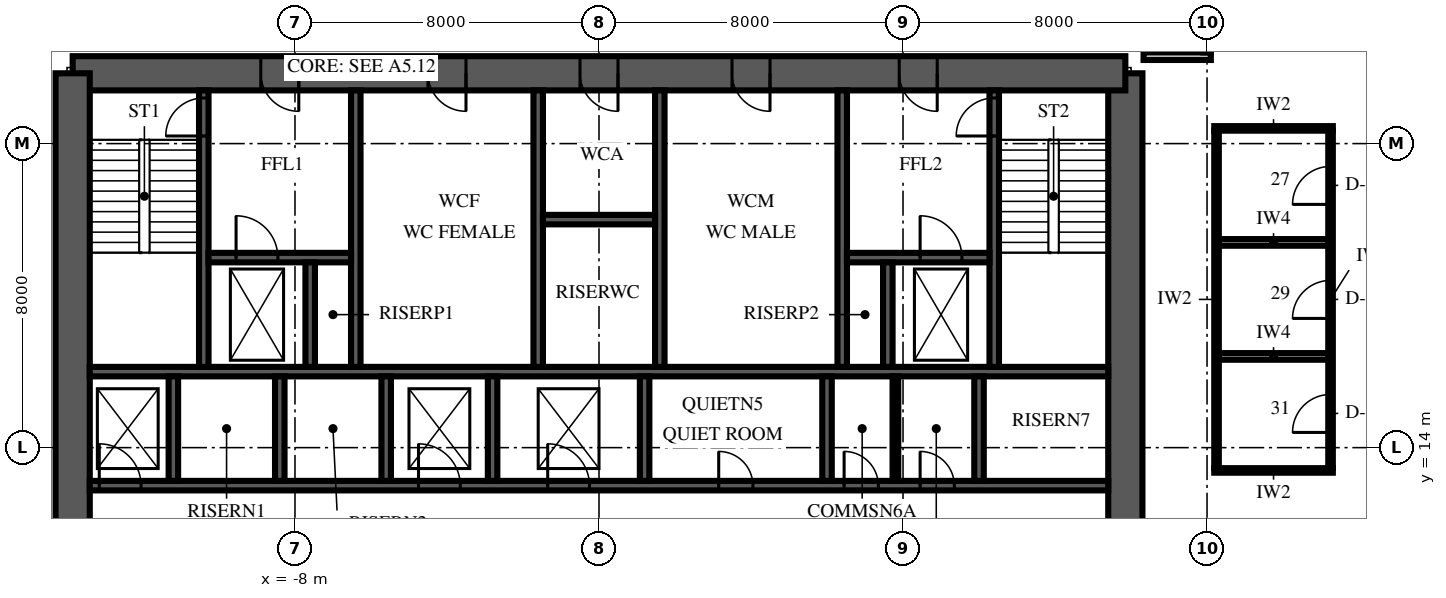
"""IFC4 building model, lengths in metres.
Left out: names, types, materials, properties, quantities, classifications, styles, units other than length and angle.
Written with IfcOpenShell. Run it as: python <this file> out.ifc"""

import sys

from ifc_helpers import new_model, si_unit, direction, frame, frame_2d, origin, place, context, subcontext, project, spatial, polyline, rectangle, outline, extrude, element, fill, save


model = new_model("IFC4")
c1 = context("Model", 3, precision=1e-05, world=origin(), true_north=direction((0.0, 1.0)))
c2 = subcontext(c1, "Body", "Model", "MODEL_VIEW")
j1 = project(units=[si_unit("LENGTHUNIT", "METRE"), si_unit("PLANEANGLEUNIT", "RADIAN")], contexts=[c1])
p1 = place(None, origin())
s1 = spatial("IfcSite", under=j1, at=p1, CompositionType="ELEMENT")
p2 = place(p1, origin())
s2 = spatial("IfcBuilding", under=s1, at=p2, CompositionType="ELEMENT")
p3 = place(p2, frame((0.0, 0.0, 72.0)))
s3 = spatial("IfcBuildingStorey", under=s2, at=p3, CompositionType="ELEMENT", Elevation=72.0)
p4 = place(p3, frame((13.85, 6.15, 0.0), z_axis=(0.0, 0.0, 1.0), x_axis=(0.0, 1.0, 0.0)))
e1 = element("IfcWall", 1, at=p4, inside=s3, PredefinedType="SHEAR", context=c2, shape_type="SweptSolid", body=[
    extrude(outline(polyline([(0.0, -0.45), (17.7, -0.45), (17.7, 0.0), (17.25, 0.0), (17.25, 0.45), (0.45, 0.45), (0.45, 0.0), (0.0, 0.0), (0.0, -0.45)])), origin(), (0.0, 0.0, 1.0), 4.0),
])
p5 = place(p4, frame((4.15, 0.0, 0.0)))
e2 = element("IfcOpeningElement", 2, at=p5, cuts=e1, PredefinedType="OPENING", context=c2, shape_type="SweptSolid", body=[
    extrude(rectangle(XDim=1.8, YDim=2.4, at=frame_2d((0.9, 1.2))), frame((0.0, 0.465, 0.0), z_axis=(0.0, -1.0, 0.0), x_axis=(1.0, 0.0, 0.0)), (0.0, 0.0, 1.0), 0.93),
])
p6 = place(p3, frame((13.85, 23.85, 0.0), z_axis=(0.0, 0.0, 1.0), x_axis=(-1.0, 0.0, 0.0)))
e3 = element("IfcWall", 3, at=p6, inside=s3, PredefinedType="SHEAR", context=c2, shape_type="SweptSolid", body=[
    extrude(rectangle(XDim=27.7, YDim=0.9, at=frame_2d((13.85, 0.0))), origin(), (0.0, 0.0, 1.0), 4.0),
])
p7 = place(p6, frame((21.75, 0.0, 0.0)))
e4 = element("IfcOpeningElement", 4, at=p7, cuts=e3, PredefinedType="OPENING", context=c2, shape_type="SweptSolid", body=[
    extrude(rectangle(XDim=1.0, YDim=2.1, at=frame_2d((0.5, 1.05))), frame((0.0, 0.465, 0.0), z_axis=(0.0, -1.0, 0.0), x_axis=(1.0, 0.0, 0.0)), (0.0, 0.0, 1.0), 0.93),
])
p8 = place(p6, frame((4.95, 0.0, 0.0)))
e5 = element("IfcOpeningElement", 5, at=p8, cuts=e3, PredefinedType="OPENING", context=c2, shape_type="SweptSolid", body=[
    extrude(rectangle(XDim=1.0, YDim=2.1, at=frame_2d((0.5, 1.05))), frame((0.0, 0.465, 0.0), z_axis=(0.0, -1.0, 0.0), x_axis=(1.0, 0.0, 0.0)), (0.0, 0.0, 1.0), 0.93),
])
p9 = place(p6, frame((17.35, 0.0, 0.0)))
e6 = element("IfcOpeningElement", 6, at=p9, cuts=e3, PredefinedType="OPENING", context=c2, shape_type="SweptSolid", body=[
    extrude(rectangle(XDim=1.0, YDim=2.1, at=frame_2d((0.5, 1.05))), frame((0.0, 0.465, 0.0), z_axis=(0.0, -1.0, 0.0), x_axis=(1.0, 0.0, 0.0)), (0.0, 0.0, 1.0), 0.93),
])
p10 = place(p6, frame((13.35, 0.0, 0.0)))
e7 = element("IfcOpeningElement", 7, at=p10, cuts=e3, PredefinedType="OPENING", context=c2, shape_type="SweptSolid", body=[
    extrude(rectangle(XDim=1.0, YDim=2.1, at=frame_2d((0.5, 1.05))), frame((0.0, 0.465, 0.0), z_axis=(0.0, -1.0, 0.0), x_axis=(1.0, 0.0, 0.0)), (0.0, 0.0, 1.0), 0.93),
])
p11 = place(p6, frame((9.35, 0.0, 0.0)))
e8 = element("IfcOpeningElement", 8, at=p11, cuts=e3, PredefinedType="OPENING", context=c2, shape_type="SweptSolid", body=[
    extrude(rectangle(XDim=1.0, YDim=2.1, at=frame_2d((0.5, 1.05))), frame((0.0, 0.465, 0.0), z_axis=(0.0, -1.0, 0.0), x_axis=(1.0, 0.0, 0.0)), (0.0, 0.0, 1.0), 0.93),
])
p12 = place(p3, frame((-13.85, 23.85, 0.0), z_axis=(0.0, 0.0, 1.0), x_axis=(0.0, -1.0, 0.0)))
e9 = element("IfcWall", 9, at=p12, inside=s3, PredefinedType="SHEAR", context=c2, shape_type="SweptSolid", body=[
    extrude(outline(polyline([(0.0, -0.45), (17.7, -0.45), (17.7, 0.0), (17.25, 0.0), (17.25, 0.45), (0.45, 0.45), (0.45, 0.0), (0.0, 0.0), (0.0, -0.45)])), origin(), (0.0, 0.0, 1.0), 4.0),
])
p13 = place(p12, frame((11.75, 0.0, 0.0)))
e10 = element("IfcOpeningElement", 10, at=p13, cuts=e9, PredefinedType="OPENING", context=c2, shape_type="SweptSolid", body=[
    extrude(rectangle(XDim=1.8, YDim=2.4, at=frame_2d((0.9, 1.2))), frame((0.0, 0.465, 0.0), z_axis=(0.0, -1.0, 0.0), x_axis=(1.0, 0.0, 0.0)), (0.0, 0.0, 1.0), 0.93),
])
p14 = place(p3, frame((-13.4, 13.0, 0.0), z_axis=(0.0, 0.0, 1.0), x_axis=(1.0, 0.0, 0.0)))
e11 = element("IfcWall", 11, at=p14, inside=s3, PredefinedType="SHEAR", context=c2, shape_type="SweptSolid", body=[
    extrude(rectangle(XDim=26.8, YDim=0.25, at=frame_2d((13.4, 0.0))), origin(), (0.0, 0.0, 1.0), 4.0),
])
p15 = place(p14, frame((0.25, 0.0, 0.0)))
e12 = element("IfcOpeningElement", 12, at=p15, cuts=e11, PredefinedType="OPENING", context=c2, shape_type="SweptSolid", body=[
    extrude(rectangle(XDim=1.1, YDim=2.1, at=frame_2d((0.55, 1.05))), frame((0.0, 0.14, 0.0), z_axis=(0.0, -1.0, 0.0), x_axis=(1.0, 0.0, 0.0)), (0.0, 0.0, 1.0), 0.28),
])
p16 = place(p14, frame((8.65, 0.0, 0.0)))
e13 = element("IfcOpeningElement", 13, at=p16, cuts=e11, PredefinedType="OPENING", context=c2, shape_type="SweptSolid", body=[
    extrude(rectangle(XDim=1.1, YDim=2.1, at=frame_2d((0.55, 1.05))), frame((0.0, 0.14, 0.0), z_axis=(0.0, -1.0, 0.0), x_axis=(1.0, 0.0, 0.0)), (0.0, 0.0, 1.0), 0.28),
])
p17 = place(p14, frame((12.05, 0.0, 0.0)))
e14 = element("IfcOpeningElement", 14, at=p17, cuts=e11, PredefinedType="OPENING", context=c2, shape_type="SweptSolid", body=[
    extrude(rectangle(XDim=1.1, YDim=2.1, at=frame_2d((0.55, 1.05))), frame((0.0, 0.14, 0.0), z_axis=(0.0, -1.0, 0.0), x_axis=(1.0, 0.0, 0.0)), (0.0, 0.0, 1.0), 0.28),
])
p18 = place(p14, frame((16.55, 0.0, 0.0)))
e15 = element("IfcOpeningElement", 15, at=p18, cuts=e11, PredefinedType="OPENING", context=c2, shape_type="SweptSolid", body=[
    extrude(rectangle(XDim=0.9, YDim=2.1, at=frame_2d((0.45, 1.05))), frame((0.0, 0.14, 0.0), z_axis=(0.0, -1.0, 0.0), x_axis=(1.0, 0.0, 0.0)), (0.0, 0.0, 1.0), 0.28),
])
p19 = place(p14, frame((19.85, 0.0, 0.0)))
e16 = element("IfcOpeningElement", 16, at=p19, cuts=e11, PredefinedType="OPENING", context=c2, shape_type="SweptSolid", body=[
    extrude(rectangle(XDim=0.9, YDim=2.1, at=frame_2d((0.45, 1.05))), frame((0.0, 0.14, 0.0), z_axis=(0.0, -1.0, 0.0), x_axis=(1.0, 0.0, 0.0)), (0.0, 0.0, 1.0), 0.28),
])
p20 = place(p14, frame((21.85, 0.0, 0.0)))
e17 = element("IfcOpeningElement", 17, at=p20, cuts=e11, PredefinedType="OPENING", context=c2, shape_type="SweptSolid", body=[
    extrude(rectangle(XDim=0.9, YDim=2.1, at=frame_2d((0.45, 1.05))), frame((0.0, 0.14, 0.0), z_axis=(0.0, -1.0, 0.0), x_axis=(1.0, 0.0, 0.0)), (0.0, 0.0, 1.0), 0.28),
])
p21 = place(p3, frame((-13.4, 16.0, 0.0), z_axis=(0.0, 0.0, 1.0), x_axis=(1.0, 0.0, 0.0)))
e18 = element("IfcWall", 18, at=p21, inside=s3, PredefinedType="SHEAR", context=c2, shape_type="SweptSolid", body=[
    extrude(rectangle(XDim=26.8, YDim=0.25, at=frame_2d((13.4, 0.0))), origin(), (0.0, 0.0, 1.0), 4.0),
])
for number, where, z_axis, x_axis in (
    (19, (-11.2, 13.125, 0.0), (0.0, 0.0, 1.0), (0.0, 1.0, 0.0)),
    (20, (-8.4, 13.125, 0.0), (0.0, 0.0, 1.0), (0.0, 1.0, 0.0)),
    (21, (-5.6, 13.125, 0.0), (0.0, 0.0, 1.0), (0.0, 1.0, 0.0)),
    (22, (-2.8, 13.125, 0.0), (0.0, 0.0, 1.0), (0.0, 1.0, 0.0)),
    (23, (1.2, 13.125, 0.0), (0.0, 0.0, 1.0), (0.0, 1.0, 0.0)),
    (24, (6.0, 13.125, 0.0), (0.0, 0.0, 1.0), (0.0, 1.0, 0.0)),
    (25, (10.0, 13.125, 0.0), (0.0, 0.0, 1.0), (0.0, 1.0, 0.0)),
):
    element("IfcWall", number, at=place(p3, frame(where, z_axis=z_axis, x_axis=x_axis)), inside=s3, PredefinedType="SHEAR", context=c2, shape_type="SweptSolid", body=[
        extrude(rectangle(XDim=2.75, YDim=0.25, at=frame_2d((1.375, 0.0))), origin(), (0.0, 0.0, 1.0), 4.0),
    ])
p22 = place(p3, frame((-10.4, 16.125, 0.0), z_axis=(0.0, 0.0, 1.0), x_axis=(0.0, 1.0, 0.0)))
e26 = element("IfcWall", 26, at=p22, inside=s3, PredefinedType="SHEAR", context=c2, shape_type="SweptSolid", body=[
    extrude(rectangle(XDim=7.275, YDim=0.25, at=frame_2d((3.637, 0.0))), origin(), (0.0, 0.0, 1.0), 4.0),
])
p23 = place(p22, frame((6.075, 0.0, 0.0)))
e27 = element("IfcOpeningElement", 27, at=p23, cuts=e26, PredefinedType="OPENING", context=c2, shape_type="SweptSolid", body=[
    extrude(rectangle(XDim=1.0, YDim=2.1, at=frame_2d((0.5, 1.05))), frame((0.0, 0.14, 0.0), z_axis=(0.0, -1.0, 0.0), x_axis=(1.0, 0.0, 0.0)), (0.0, 0.0, 1.0), 0.28),
])
for number, where, z_axis, x_axis in (
    (28, (-6.4, 16.125, 0.0), (0.0, 0.0, 1.0), (0.0, 1.0, 0.0)),
    (29, (-1.6, 16.125, 0.0), (0.0, 0.0, 1.0), (0.0, 1.0, 0.0)),
    (30, (1.6, 16.125, 0.0), (0.0, 0.0, 1.0), (0.0, 1.0, 0.0)),
    (31, (6.4, 16.125, 0.0), (0.0, 0.0, 1.0), (0.0, 1.0, 0.0)),
):
    element("IfcWall", number, at=place(p3, frame(where, z_axis=z_axis, x_axis=x_axis)), inside=s3, PredefinedType="SHEAR", context=c2, shape_type="SweptSolid", body=[
        extrude(rectangle(XDim=7.275, YDim=0.25, at=frame_2d((3.637, 0.0))), origin(), (0.0, 0.0, 1.0), 4.0),
    ])
p24 = place(p3, frame((10.4, 16.125, 0.0), z_axis=(0.0, 0.0, 1.0), x_axis=(0.0, 1.0, 0.0)))
e32 = element("IfcWall", 32, at=p24, inside=s3, PredefinedType="SHEAR", context=c2, shape_type="SweptSolid", body=[
    extrude(rectangle(XDim=7.275, YDim=0.25, at=frame_2d((3.637, 0.0))), origin(), (0.0, 0.0, 1.0), 4.0),
])
p25 = place(p24, frame((6.075, 0.0, 0.0)))
e33 = element("IfcOpeningElement", 33, at=p25, cuts=e32, PredefinedType="OPENING", context=c2, shape_type="SweptSolid", body=[
    extrude(rectangle(XDim=1.0, YDim=2.1, at=frame_2d((0.5, 1.05))), frame((0.0, 0.14, 0.0), z_axis=(0.0, -1.0, 0.0), x_axis=(1.0, 0.0, 0.0)), (0.0, 0.0, 1.0), 0.28),
])
p26 = place(p3, frame((-10.275, 19.0, 0.0), z_axis=(0.0, 0.0, 1.0), x_axis=(1.0, 0.0, 0.0)))
e34 = element("IfcWall", 34, at=p26, inside=s3, PredefinedType="SHEAR", context=c2, shape_type="SweptSolid", body=[
    extrude(rectangle(XDim=3.75, YDim=0.25, at=frame_2d((1.875, 0.0))), origin(), (0.0, 0.0, 1.0), 4.0),
])
p27 = place(p26, frame((0.725, 0.0, 0.0)))
e35 = element("IfcOpeningElement", 35, at=p27, cuts=e34, PredefinedType="OPENING", context=c2, shape_type="SweptSolid", body=[
    extrude(rectangle(XDim=1.1, YDim=2.1, at=frame_2d((0.55, 1.05))), frame((0.0, 0.14, 0.0), z_axis=(0.0, -1.0, 0.0), x_axis=(1.0, 0.0, 0.0)), (0.0, 0.0, 1.0), 0.28),
])
p28 = place(p3, frame((6.525, 19.0, 0.0), z_axis=(0.0, 0.0, 1.0), x_axis=(1.0, 0.0, 0.0)))
e36 = element("IfcWall", 36, at=p28, inside=s3, PredefinedType="SHEAR", context=c2, shape_type="SweptSolid", body=[
    extrude(rectangle(XDim=3.75, YDim=0.25, at=frame_2d((1.875, 0.0))), origin(), (0.0, 0.0, 1.0), 4.0),
])
p29 = place(p28, frame((1.925, 0.0, 0.0)))
e37 = element("IfcOpeningElement", 37, at=p29, cuts=e36, PredefinedType="OPENING", context=c2, shape_type="SweptSolid", body=[
    extrude(rectangle(XDim=1.1, YDim=2.1, at=frame_2d((0.55, 1.05))), frame((0.0, 0.14, 0.0), z_axis=(0.0, -1.0, 0.0), x_axis=(1.0, 0.0, 0.0)), (0.0, 0.0, 1.0), 0.28),
])
for number, where, z_axis, x_axis in (
    (38, (-7.6, 16.125, 0.0), (0.0, 0.0, 1.0), (0.0, 1.0, 0.0)),
    (39, (7.6, 16.125, 0.0), (0.0, 0.0, 1.0), (0.0, 1.0, 0.0)),
):
    element("IfcWall", number, at=place(p3, frame(where, z_axis=z_axis, x_axis=x_axis)), inside=s3, PredefinedType="SHEAR", context=c2, shape_type="SweptSolid", body=[
        extrude(rectangle(XDim=2.75, YDim=0.25, at=frame_2d((1.375, 0.0))), origin(), (0.0, 0.0, 1.0), 4.0),
    ])
p30 = place(p3, frame((-1.475, 20.0, 0.0), z_axis=(0.0, 0.0, 1.0), x_axis=(1.0, 0.0, 0.0)))
e40 = element("IfcWall", 40, at=p30, inside=s3, PredefinedType="SHEAR", context=c2, shape_type="SweptSolid", body=[
    extrude(rectangle(XDim=2.95, YDim=0.25, at=frame_2d((1.475, 0.0))), origin(), (0.0, 0.0, 1.0), 4.0),
])
p31 = place(p3, frame((7.8, 13.125, 0.0), z_axis=(0.0, 0.0, 1.0), x_axis=(0.0, 1.0, 0.0)))
e41 = element("IfcWall", 41, at=p31, inside=s3, PredefinedType="PARTITIONING", context=c2, shape_type="SweptSolid", body=[
    extrude(rectangle(XDim=2.75, YDim=0.15, at=frame_2d((1.375, 0.0))), origin(), (0.0, 0.0, 1.0), 3.85),
])
p32 = place(p3, frame((16.19, 13.4, 0.0), z_axis=(0.0, 0.0, 1.0), x_axis=(1.0, 0.0, 0.0)))
e42 = element("IfcWall", 42, at=p32, inside=s3, PredefinedType="PARTITIONING", context=c2, shape_type="SweptSolid", body=[
    extrude(rectangle(XDim=3.12, YDim=0.12, at=frame_2d((1.56, 0.0))), origin(), (0.0, 0.0, 1.0), 3.85),
])
for number, where, z_axis, x_axis in (
    (43, (16.31, 16.4, 0.0), (0.0, 0.0, 1.0), (1.0, 0.0, 0.0)),
    (44, (16.31, 19.4, 0.0), (0.0, 0.0, 1.0), (1.0, 0.0, 0.0)),
):
    element("IfcWall", number, at=place(p3, frame(where, z_axis=z_axis, x_axis=x_axis)), inside=s3, PredefinedType="PARTITIONING", context=c2, shape_type="SweptSolid", body=[
        extrude(rectangle(XDim=2.88, YDim=0.175, at=frame_2d((1.44, 0.0))), origin(), (0.0, 0.0, 1.0), 3.85),
    ])
p33 = place(p3, frame((16.19, 22.4, 0.0), z_axis=(0.0, 0.0, 1.0), x_axis=(1.0, 0.0, 0.0)))
e45 = element("IfcWall", 45, at=p33, inside=s3, PredefinedType="PARTITIONING", context=c2, shape_type="SweptSolid", body=[
    extrude(rectangle(XDim=3.12, YDim=0.12, at=frame_2d((1.56, 0.0))), origin(), (0.0, 0.0, 1.0), 3.85),
])
p34 = place(p3, frame((14.33, 24.3, 0.0), z_axis=(0.0, 0.0, 1.0), x_axis=(1.0, 0.0, 0.0)))
e46 = element("IfcWall", 46, at=p34, inside=s3, PredefinedType="PARTITIONING", context=c2, shape_type="SweptSolid", body=[
    extrude(rectangle(XDim=1.77, YDim=0.2, at=frame_2d((0.885, 0.0))), origin(), (0.0, 0.0, 1.0), 3.4),
])
p35 = place(p3, frame((16.25, 13.46, 0.0), z_axis=(0.0, 0.0, 1.0), x_axis=(0.0, 1.0, 0.0)))
e47 = element("IfcWall", 47, at=p35, inside=s3, PredefinedType="PARTITIONING", context=c2, shape_type="SweptSolid", body=[
    extrude(rectangle(XDim=8.88, YDim=0.12, at=frame_2d((4.44, 0.0))), origin(), (0.0, 0.0, 1.0), 3.25),
])
p36 = place(p3, frame((19.25, 13.46, 0.0), z_axis=(0.0, 0.0, 1.0), x_axis=(0.0, 1.0, 0.0)))
e48 = element("IfcWall", 48, at=p36, inside=s3, PredefinedType="PARTITIONING", context=c2, shape_type="SweptSolid", body=[
    extrude(rectangle(XDim=8.88, YDim=0.12, at=frame_2d((4.44, 0.0))), origin(), (0.0, 0.0, 1.0), 3.25),
])
p37 = place(p36, frame((0.94, 0.0, 0.0)))
e49 = element("IfcOpeningElement", 49, at=p37, cuts=e48, PredefinedType="OPENING", context=c2, shape_type="SweptSolid", body=[
    extrude(rectangle(XDim=1.0, YDim=2.4, at=frame_2d((0.5, 1.2))), frame((0.0, 0.075, 0.0), z_axis=(0.0, -1.0, 0.0), x_axis=(1.0, 0.0, 0.0)), (0.0, 0.0, 1.0), 0.15),
])
p38 = place(p36, frame((3.94, 0.0, 0.0)))
e50 = element("IfcOpeningElement", 50, at=p38, cuts=e48, PredefinedType="OPENING", context=c2, shape_type="SweptSolid", body=[
    extrude(rectangle(XDim=1.0, YDim=2.4, at=frame_2d((0.5, 1.2))), frame((0.0, 0.075, 0.0), z_axis=(0.0, -1.0, 0.0), x_axis=(1.0, 0.0, 0.0)), (0.0, 0.0, 1.0), 0.15),
])
p39 = place(p36, frame((6.94, 0.0, 0.0)))
e51 = element("IfcOpeningElement", 51, at=p39, cuts=e48, PredefinedType="OPENING", context=c2, shape_type="SweptSolid", body=[
    extrude(rectangle(XDim=1.0, YDim=2.4, at=frame_2d((0.5, 1.2))), frame((0.0, 0.075, 0.0), z_axis=(0.0, -1.0, 0.0), x_axis=(1.0, 0.0, 0.0)), (0.0, 0.0, 1.0), 0.15),
])
p40 = place(p7, origin())
e52 = element("IfcDoor", 52, at=p40, inside=s3, OperationType="SINGLE_SWING_RIGHT", PredefinedType="DOOR", context=c2, shape_type="SweptSolid", body=[
    extrude(rectangle(XDim=1.0, YDim=2.1, at=frame_2d((0.5, 1.05))), frame((0.0, 0.45, 0.0), z_axis=(0.0, -1.0, 0.0), x_axis=(1.0, 0.0, 0.0)), (0.0, 0.0, 1.0), 0.899),
])
fill(e4, e52)
p41 = place(p8, origin())
e53 = element("IfcDoor", 53, at=p41, inside=s3, OperationType="SINGLE_SWING_RIGHT", PredefinedType="DOOR", context=c2, shape_type="SweptSolid", body=[
    extrude(rectangle(XDim=1.0, YDim=2.1, at=frame_2d((0.5, 1.05))), frame((0.0, 0.45, 0.0), z_axis=(0.0, -1.0, 0.0), x_axis=(1.0, 0.0, 0.0)), (0.0, 0.0, 1.0), 0.899),
])
fill(e5, e53)
p42 = place(p9, origin())
e54 = element("IfcDoor", 54, at=p42, inside=s3, OperationType="SINGLE_SWING_LEFT", PredefinedType="DOOR", context=c2, shape_type="SweptSolid", body=[
    extrude(rectangle(XDim=1.0, YDim=2.1, at=frame_2d((0.5, 1.05))), frame((0.0, 0.45, 0.0), z_axis=(0.0, -1.0, 0.0), x_axis=(1.0, 0.0, 0.0)), (0.0, 0.0, 1.0), 0.899),
])
fill(e6, e54)
p43 = place(p10, origin())
e55 = element("IfcDoor", 55, at=p43, inside=s3, OperationType="SINGLE_SWING_LEFT", PredefinedType="DOOR", context=c2, shape_type="SweptSolid", body=[
    extrude(rectangle(XDim=1.0, YDim=2.1, at=frame_2d((0.5, 1.05))), frame((0.0, 0.45, 0.0), z_axis=(0.0, -1.0, 0.0), x_axis=(1.0, 0.0, 0.0)), (0.0, 0.0, 1.0), 0.899),
])
fill(e7, e55)
p44 = place(p11, origin())
e56 = element("IfcDoor", 56, at=p44, inside=s3, OperationType="SINGLE_SWING_LEFT", PredefinedType="DOOR", context=c2, shape_type="SweptSolid", body=[
    extrude(rectangle(XDim=1.0, YDim=2.1, at=frame_2d((0.5, 1.05))), frame((0.0, 0.45, 0.0), z_axis=(0.0, -1.0, 0.0), x_axis=(1.0, 0.0, 0.0)), (0.0, 0.0, 1.0), 0.899),
])
fill(e8, e56)
p45 = place(p23, origin())
e57 = element("IfcDoor", 57, at=p45, inside=s3, OperationType="SINGLE_SWING_LEFT", PredefinedType="DOOR", context=c2, shape_type="SweptSolid", body=[
    extrude(rectangle(XDim=1.0, YDim=2.1, at=frame_2d((0.5, 1.05))), frame((0.0, 0.125, 0.0), z_axis=(0.0, -1.0, 0.0), x_axis=(1.0, 0.0, 0.0)), (0.0, 0.0, 1.0), 0.25),
])
fill(e27, e57)
p46 = place(p25, origin())
e58 = element("IfcDoor", 58, at=p46, inside=s3, OperationType="SINGLE_SWING_LEFT", PredefinedType="DOOR", context=c2, shape_type="SweptSolid", body=[
    extrude(rectangle(XDim=1.0, YDim=2.1, at=frame_2d((0.5, 1.05))), frame((0.0, 0.125, 0.0), z_axis=(0.0, -1.0, 0.0), x_axis=(1.0, 0.0, 0.0)), (0.0, 0.0, 1.0), 0.25),
])
fill(e33, e58)
p47 = place(p15, origin())
e59 = element("IfcDoor", 59, at=p47, inside=s3, OperationType="SLIDING_TO_LEFT", PredefinedType="DOOR", context=c2, shape_type="SweptSolid", body=[
    extrude(rectangle(XDim=1.1, YDim=2.1, at=frame_2d((0.55, 1.05))), frame((0.0, 0.125, 0.0), z_axis=(0.0, -1.0, 0.0), x_axis=(1.0, 0.0, 0.0)), (0.0, 0.0, 1.0), 0.25),
])
fill(e12, e59)
p48 = place(p16, origin())
e60 = element("IfcDoor", 60, at=p48, inside=s3, OperationType="SLIDING_TO_LEFT", PredefinedType="DOOR", context=c2, shape_type="SweptSolid", body=[
    extrude(rectangle(XDim=1.1, YDim=2.1, at=frame_2d((0.55, 1.05))), frame((0.0, 0.125, 0.0), z_axis=(0.0, -1.0, 0.0), x_axis=(1.0, 0.0, 0.0)), (0.0, 0.0, 1.0), 0.25),
])
fill(e13, e60)
p49 = place(p17, origin())
e61 = element("IfcDoor", 61, at=p49, inside=s3, OperationType="SLIDING_TO_LEFT", PredefinedType="DOOR", context=c2, shape_type="SweptSolid", body=[
    extrude(rectangle(XDim=1.1, YDim=2.1, at=frame_2d((0.55, 1.05))), frame((0.0, 0.125, 0.0), z_axis=(0.0, -1.0, 0.0), x_axis=(1.0, 0.0, 0.0)), (0.0, 0.0, 1.0), 0.25),
])
fill(e14, e61)
p50 = place(p29, origin())
e62 = element("IfcDoor", 62, at=p50, inside=s3, OperationType="SLIDING_TO_RIGHT", PredefinedType="DOOR", context=c2, shape_type="SweptSolid", body=[
    extrude(rectangle(XDim=1.1, YDim=2.1, at=frame_2d((0.55, 1.05))), frame((0.0, 0.125, 0.0), z_axis=(0.0, -1.0, 0.0), x_axis=(1.0, 0.0, 0.0)), (0.0, 0.0, 1.0), 0.25),
])
fill(e37, e62)
p51 = place(p27, origin())
e63 = element("IfcDoor", 63, at=p51, inside=s3, OperationType="SLIDING_TO_RIGHT", PredefinedType="DOOR", context=c2, shape_type="SweptSolid", body=[
    extrude(rectangle(XDim=1.1, YDim=2.1, at=frame_2d((0.55, 1.05))), frame((0.0, 0.125, 0.0), z_axis=(0.0, -1.0, 0.0), x_axis=(1.0, 0.0, 0.0)), (0.0, 0.0, 1.0), 0.25),
])
fill(e35, e63)
p52 = place(p18, origin())
e64 = element("IfcDoor", 64, at=p52, inside=s3, OperationType="SINGLE_SWING_LEFT", PredefinedType="DOOR", context=c2, shape_type="SweptSolid", body=[
    extrude(rectangle(XDim=0.9, YDim=2.1, at=frame_2d((0.45, 1.05))), frame((0.0, 0.125, 0.0), z_axis=(0.0, -1.0, 0.0), x_axis=(1.0, 0.0, 0.0)), (0.0, 0.0, 1.0), 0.25),
])
fill(e15, e64)
p53 = place(p19, origin())
e65 = element("IfcDoor", 65, at=p53, inside=s3, OperationType="SINGLE_SWING_LEFT", PredefinedType="DOOR", context=c2, shape_type="SweptSolid", body=[
    extrude(rectangle(XDim=0.9, YDim=2.1, at=frame_2d((0.45, 1.05))), frame((0.0, 0.125, 0.0), z_axis=(0.0, -1.0, 0.0), x_axis=(1.0, 0.0, 0.0)), (0.0, 0.0, 1.0), 0.25),
])
fill(e16, e65)
p54 = place(p20, origin())
e66 = element("IfcDoor", 66, at=p54, inside=s3, OperationType="SINGLE_SWING_LEFT", PredefinedType="DOOR", context=c2, shape_type="SweptSolid", body=[
    extrude(rectangle(XDim=0.9, YDim=2.1, at=frame_2d((0.45, 1.05))), frame((0.0, 0.125, 0.0), z_axis=(0.0, -1.0, 0.0), x_axis=(1.0, 0.0, 0.0)), (0.0, 0.0, 1.0), 0.25),
])
fill(e17, e66)
p55 = place(p37, origin())
e67 = element("IfcDoor", 67, at=p55, inside=s3, OperationType="SINGLE_SWING_RIGHT", PredefinedType="DOOR", context=c2, shape_type="SweptSolid", body=[
    extrude(rectangle(XDim=1.0, YDim=2.4, at=frame_2d((0.5, 1.2))), frame((0.0, 0.06, 0.0), z_axis=(0.0, -1.0, 0.0), x_axis=(1.0, 0.0, 0.0)), (0.0, 0.0, 1.0), 0.12),
])
fill(e49, e67)
p56 = place(p38, origin())
e68 = element("IfcDoor", 68, at=p56, inside=s3, OperationType="SINGLE_SWING_RIGHT", PredefinedType="DOOR", context=c2, shape_type="SweptSolid", body=[
    extrude(rectangle(XDim=1.0, YDim=2.4, at=frame_2d((0.5, 1.2))), frame((0.0, 0.06, 0.0), z_axis=(0.0, -1.0, 0.0), x_axis=(1.0, 0.0, 0.0)), (0.0, 0.0, 1.0), 0.12),
])
fill(e50, e68)
p57 = place(p39, origin())
e69 = element("IfcDoor", 69, at=p57, inside=s3, OperationType="SINGLE_SWING_RIGHT", PredefinedType="DOOR", context=c2, shape_type="SweptSolid", body=[
    extrude(rectangle(XDim=1.0, YDim=2.4, at=frame_2d((0.5, 1.2))), frame((0.0, 0.06, 0.0), z_axis=(0.0, -1.0, 0.0), x_axis=(1.0, 0.0, 0.0)), (0.0, 0.0, 1.0), 0.12),
])
fill(e51, e69)
save(model, sys.argv[1])
